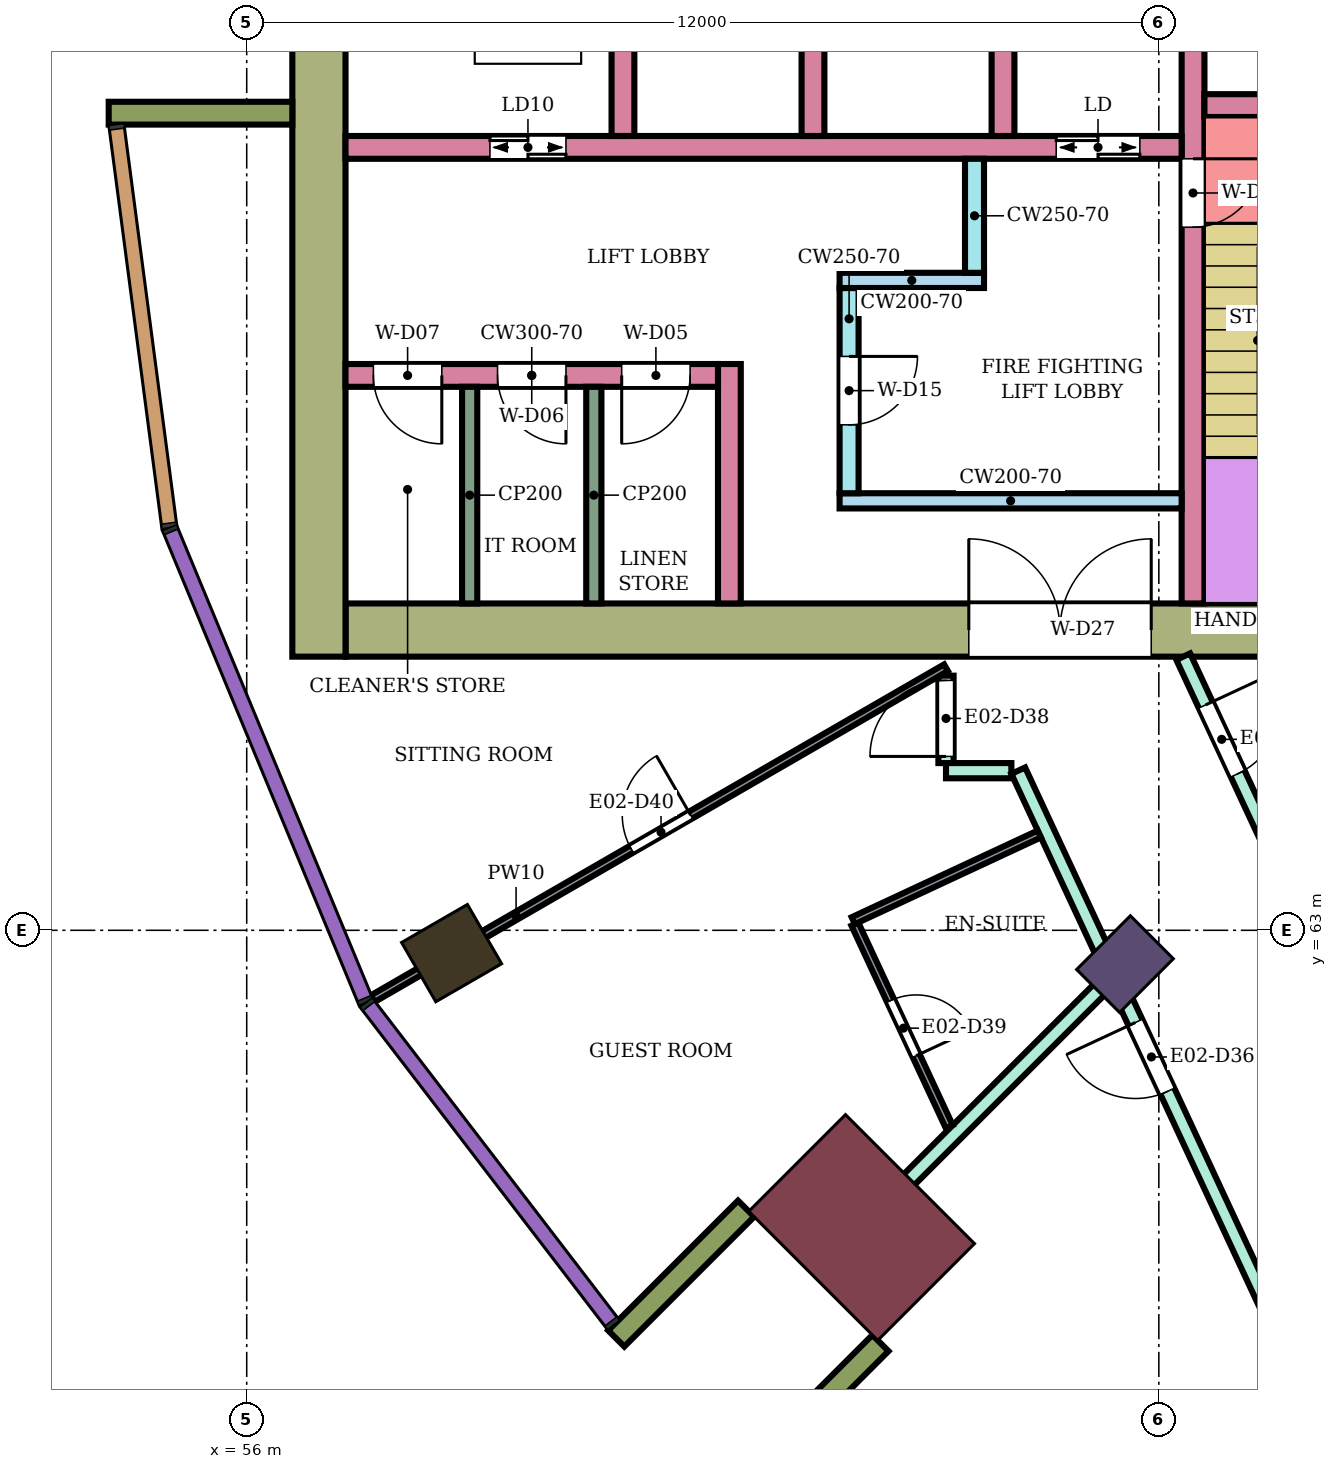
"""IFC4 building model, lengths in metres.
Left out: names, types, materials, properties, quantities, classifications, styles, units other than length and angle.
Written with IfcOpenShell. Run it as: python <this file> out.ifc"""

import sys

from ifc_helpers import new_model, si_unit, direction, frame, frame_2d, origin, origin_2d, place, context, subcontext, project, spatial, rectangle, extrude, element, fill, save


model = new_model("IFC4")
c1 = context("Model", 3, precision=1e-05, world=origin(), true_north=direction((0.0, 1.0)))
c2 = subcontext(c1, "Body", "Model", "MODEL_VIEW")
j1 = project(units=[si_unit("LENGTHUNIT", "METRE"), si_unit("PLANEANGLEUNIT", "RADIAN")], contexts=[c1])
p1 = place(None, origin())
s1 = spatial("IfcSite", under=j1, at=p1, CompositionType="ELEMENT")
p2 = place(p1, origin())
s2 = spatial("IfcBuilding", under=s1, at=p2, CompositionType="ELEMENT")
p3 = place(p2, frame((0.0, 0.0, 134.1)))
s3 = spatial("IfcBuildingStorey", under=s2, at=p3, CompositionType="ELEMENT", Elevation=134.1)
p4 = place(p3, frame((58.696, 62.7, 0.0), z_axis=(0.0, 0.0, 1.0), x_axis=(-0.866025403784, -0.5, 0.0)))
e1 = element("IfcColumn", 1, at=p4, inside=s3, PredefinedType="COLUMN", context=c2, shape_type="SweptSolid", body=[
    extrude(rectangle(XDim=1.0, YDim=0.9, at=origin_2d()), origin(), (0.0, 0.0, 1.0), 3.9),
])
p5 = place(p3, frame((67.555, 62.555, 0.0), z_axis=(0.0, 0.0, 1.0), x_axis=(-0.707106781187, -0.707106781187, 0.0)))
e2 = element("IfcColumn", 2, at=p5, inside=s3, PredefinedType="COLUMN", context=c2, shape_type="SweptSolid", body=[
    extrude(rectangle(XDim=1.0, YDim=0.8, at=origin_2d()), origin(), (0.0, 0.0, 1.0), 3.9),
])
p6 = place(p3, frame((64.09, 59.09, 0.0), z_axis=(0.0, 0.0, 1.0), x_axis=(-0.707106781187, -0.707106781187, 0.0)))
e3 = element("IfcColumn", 3, at=p6, inside=s3, PredefinedType="COLUMN", context=c2, shape_type="SweptSolid", body=[
    extrude(rectangle(XDim=1.8, YDim=2.4, at=origin_2d()), origin(), (0.0, 0.0, 1.0), 3.9),
])
p7 = place(p3, frame((72.1, 66.95, 0.0), z_axis=(0.0, 0.0, 1.0), x_axis=(-1.0, 0.0, 0.0)))
e4 = element("IfcWall", 4, at=p7, inside=s3, PredefinedType="SHEAR", context=c2, shape_type="SweptSolid", body=[
    extrude(rectangle(XDim=14.8, YDim=0.7, at=frame_2d((7.4, 0.0))), origin(), (0.0, 0.0, 1.0), 3.58),
])
p8 = place(p7, frame((4.2, 0.0, 0.0)))
e5 = element("IfcOpeningElement", 5, at=p8, cuts=e4, PredefinedType="OPENING", context=c2, shape_type="SweptSolid", body=[
    extrude(rectangle(XDim=2.4, YDim=2.4, at=frame_2d((1.2, 1.2))), frame((0.0, 0.36, 0.0), z_axis=(0.0, -1.0, 0.0), x_axis=(1.0, 0.0, 0.0)), (0.0, 0.0, 1.0), 0.72),
])
p9 = place(p3, frame((56.95, 83.4, 0.0), z_axis=(0.0, 0.0, 1.0), x_axis=(0.0, -1.0, 0.0)))
e6 = element("IfcWall", 6, at=p9, inside=s3, PredefinedType="SHEAR", context=c2, shape_type="SweptSolid", body=[
    extrude(rectangle(XDim=16.8, YDim=0.7, at=frame_2d((8.4, 0.0))), origin(), (0.0, 0.0, 1.0), 3.58),
])
p10 = place(p3, frame((68.45, 75.0, 0.0), z_axis=(0.0, 0.0, 1.0), x_axis=(0.0, -1.0, 0.0)))
e7 = element("IfcWall", 7, at=p10, inside=s3, PredefinedType="SHEAR", context=c2, shape_type="SweptSolid", body=[
    extrude(rectangle(XDim=7.7, YDim=0.3, at=frame_2d((3.85, 0.0))), origin(), (0.0, 0.0, 1.0), 3.58),
])
p11 = place(p10, frame((1.85, 0.0, 0.0)))
e8 = element("IfcOpeningElement", 8, at=p11, cuts=e7, PredefinedType="OPENING", context=c2, shape_type="SweptSolid", body=[
    extrude(rectangle(XDim=0.9, YDim=2.1, at=frame_2d((0.45, 1.05))), frame((0.0, 0.16, 0.0), z_axis=(0.0, -1.0, 0.0), x_axis=(1.0, 0.0, 0.0)), (0.0, 0.0, 1.0), 0.32),
])
p12 = place(p3, frame((71.65, 73.85, 0.0), z_axis=(0.0, 0.0, 1.0), x_axis=(-1.0, 0.0, 0.0)))
e9 = element("IfcWall", 9, at=p12, inside=s3, PredefinedType="SHEAR", context=c2, shape_type="SweptSolid", body=[
    extrude(rectangle(XDim=3.05, YDim=0.3, at=frame_2d((1.525, 0.0))), origin(), (0.0, 0.0, 1.0), 3.58),
])
p13 = place(p12, frame((1.1, 0.0, 0.0)))
e10 = element("IfcOpeningElement", 10, at=p13, cuts=e9, PredefinedType="OPENING", context=c2, shape_type="SweptSolid", body=[
    extrude(rectangle(XDim=0.7, YDim=2.0, at=frame_2d((0.35, 1.0))), frame((0.0, 0.16, 0.0), z_axis=(0.0, -1.0, 0.0), x_axis=(1.0, 0.0, 0.0)), (0.0, 0.0, 1.0), 0.32),
])
p14 = place(p3, frame((68.3, 73.3, 0.0), z_axis=(0.0, 0.0, 1.0), x_axis=(-1.0, 0.0, 0.0)))
e11 = element("IfcWall", 11, at=p14, inside=s3, PredefinedType="SHEAR", context=c2, shape_type="SweptSolid", body=[
    extrude(rectangle(XDim=11.0, YDim=0.3, at=frame_2d((5.5, 0.0))), origin(), (0.0, 0.0, 1.0), 3.58),
])
p15 = place(p14, frame((0.55, 0.0, 0.0)))
e12 = element("IfcOpeningElement", 12, at=p15, cuts=e11, PredefinedType="OPENING", context=c2, shape_type="SweptSolid", body=[
    extrude(rectangle(XDim=1.1, YDim=2.1, at=frame_2d((0.55, 1.05))), frame((0.0, 0.16, 0.0), z_axis=(0.0, -1.0, 0.0), x_axis=(1.0, 0.0, 0.0)), (0.0, 0.0, 1.0), 0.32),
])
p16 = place(p14, frame((8.1, 0.0, 0.0)))
e13 = element("IfcOpeningElement", 13, at=p16, cuts=e11, PredefinedType="OPENING", context=c2, shape_type="SweptSolid", body=[
    extrude(rectangle(XDim=1.0, YDim=2.1, at=frame_2d((0.5, 1.05))), frame((0.0, 0.16, 0.0), z_axis=(0.0, -1.0, 0.0), x_axis=(1.0, 0.0, 0.0)), (0.0, 0.0, 1.0), 0.32),
])
for number, where, z_axis, x_axis in (
    (14, (65.95, 76.0, 0.0), (0.0, 0.0, 1.0), (0.0, -1.0, 0.0)),
    (15, (63.45, 76.0, 0.0), (0.0, 0.0, 1.0), (0.0, -1.0, 0.0)),
    (16, (60.95, 76.0, 0.0), (0.0, 0.0, 1.0), (0.0, -1.0, 0.0)),
):
    element("IfcWall", number, at=place(p3, frame(where, z_axis=z_axis, x_axis=x_axis)), inside=s3, PredefinedType="SHEAR", context=c2, shape_type="SweptSolid", body=[
        extrude(rectangle(XDim=2.55, YDim=0.3, at=frame_2d((1.275, 0.0))), origin(), (0.0, 0.0, 1.0), 3.58),
    ])
p17 = place(p3, frame((68.3, 68.65, 0.0), z_axis=(0.0, 0.0, 1.0), x_axis=(-1.0, 0.0, 0.0)))
e17 = element("IfcWall", 17, at=p17, inside=s3, PredefinedType="SHEAR", context=c2, shape_type="SweptSolid", body=[
    extrude(rectangle(XDim=4.5, YDim=0.2, at=frame_2d((2.25, 0.0))), origin(), (0.0, 0.0, 1.0), 3.58),
])
p18 = place(p3, frame((63.925, 71.45, 0.0), z_axis=(0.0, 0.0, 1.0), x_axis=(0.0, -1.0, 0.0)))
e18 = element("IfcWall", 18, at=p18, inside=s3, PredefinedType="SHEAR", context=c2, shape_type="SweptSolid", body=[
    extrude(rectangle(XDim=2.7, YDim=0.25, at=frame_2d((1.35, 0.0))), origin(), (0.0, 0.0, 1.0), 3.58),
])
p19 = place(p18, frame((0.9, 0.0, 0.0)))
e19 = element("IfcOpeningElement", 19, at=p19, cuts=e18, PredefinedType="OPENING", context=c2, shape_type="SweptSolid", body=[
    extrude(rectangle(XDim=0.9, YDim=2.1, at=frame_2d((0.45, 1.05))), frame((0.0, 0.135, 0.0), z_axis=(0.0, -1.0, 0.0), x_axis=(1.0, 0.0, 0.0)), (0.0, 0.0, 1.0), 0.27),
])
p20 = place(p3, frame((65.7, 71.55, 0.0), z_axis=(0.0, 0.0, 1.0), x_axis=(-1.0, 0.0, 0.0)))
e20 = element("IfcWall", 20, at=p20, inside=s3, PredefinedType="SHEAR", context=c2, shape_type="SweptSolid", body=[
    extrude(rectangle(XDim=1.9, YDim=0.2, at=frame_2d((0.95, 0.0))), origin(), (0.0, 0.0, 1.0), 3.58),
])
p21 = place(p3, frame((65.575, 73.15, 0.0), z_axis=(0.0, 0.0, 1.0), x_axis=(0.0, -1.0, 0.0)))
e21 = element("IfcWall", 21, at=p21, inside=s3, PredefinedType="SHEAR", context=c2, shape_type="SweptSolid", body=[
    extrude(rectangle(XDim=1.5, YDim=0.25, at=frame_2d((0.75, 0.0))), origin(), (0.0, 0.0, 1.0), 3.58),
])
p22 = place(p3, frame((62.35, 70.45, 0.0), z_axis=(0.0, 0.0, 1.0), x_axis=(0.0, -1.0, 0.0)))
e22 = element("IfcWall", 22, at=p22, inside=s3, PredefinedType="SHEAR", context=c2, shape_type="SweptSolid", body=[
    extrude(rectangle(XDim=3.15, YDim=0.3, at=frame_2d((1.575, 0.0))), origin(), (0.0, 0.0, 1.0), 3.58),
])
p23 = place(p3, frame((62.2, 70.3, 0.0), z_axis=(0.0, 0.0, 1.0), x_axis=(-1.0, 0.0, 0.0)))
e23 = element("IfcWall", 23, at=p23, inside=s3, PredefinedType="SHEAR", context=c2, shape_type="SweptSolid", body=[
    extrude(rectangle(XDim=4.9, YDim=0.3, at=frame_2d((2.45, 0.0))), origin(), (0.0, 0.0, 1.0), 3.58),
])
p24 = place(p23, frame((0.367, 0.0, 0.0)))
e24 = element("IfcOpeningElement", 24, at=p24, cuts=e23, PredefinedType="OPENING", context=c2, shape_type="SweptSolid", body=[
    extrude(rectangle(XDim=0.9, YDim=2.1, at=frame_2d((0.45, 1.05))), frame((0.0, 0.16, 0.0), z_axis=(0.0, -1.0, 0.0), x_axis=(1.0, 0.0, 0.0)), (0.0, 0.0, 1.0), 0.32),
])
p25 = place(p23, frame((2.0, 0.0, 0.0)))
e25 = element("IfcOpeningElement", 25, at=p25, cuts=e23, PredefinedType="OPENING", context=c2, shape_type="SweptSolid", body=[
    extrude(rectangle(XDim=0.9, YDim=2.1, at=frame_2d((0.45, 1.05))), frame((0.0, 0.16, 0.0), z_axis=(0.0, -1.0, 0.0), x_axis=(1.0, 0.0, 0.0)), (0.0, 0.0, 1.0), 0.32),
])
p26 = place(p23, frame((3.633, 0.0, 0.0)))
e26 = element("IfcOpeningElement", 26, at=p26, cuts=e23, PredefinedType="OPENING", context=c2, shape_type="SweptSolid", body=[
    extrude(rectangle(XDim=0.9, YDim=2.1, at=frame_2d((0.45, 1.05))), frame((0.0, 0.16, 0.0), z_axis=(0.0, -1.0, 0.0), x_axis=(1.0, 0.0, 0.0)), (0.0, 0.0, 1.0), 0.32),
])
for number, where, z_axis, x_axis in (
    (27, (56.6, 73.75, 0.0), (0.0, 0.0, 1.0), (-1.0, 0.0, 0.0)),
    (28, (62.57, 59.338, 0.0), (0.0, 0.0, 1.0), (-0.707, -0.707, 0.0)),
    (29, (64.338, 57.57, 0.0), (0.0, 0.0, 1.0), (-0.707, -0.707, 0.0)),
):
    element("IfcWall", number, at=place(p3, frame(where, z_axis=z_axis, x_axis=x_axis)), inside=s3, PredefinedType="NOTDEFINED", context=c2, shape_type="SweptSolid", body=[
        extrude(rectangle(XDim=2.416, YDim=0.3, at=frame_2d((1.208, 0.0))), origin(), (0.0, 0.0, 1.0), 3.9),
    ])
p27 = place(p3, frame((63.592, 58.599, 0.0), z_axis=(0.0, 0.0, 1.0), x_axis=(0.707292886396, 0.706920626982, 0.0)))
e30 = element("IfcWall", 30, at=p27, inside=s3, PredefinedType="PARTITIONING", context=c2, shape_type="SweptSolid", body=[
    extrude(rectangle(XDim=5.247, YDim=0.2, at=frame_2d((2.623, 0.0))), origin(), (0.0, 0.0, 1.0), 3.45),
])
p28 = place(p3, frame((65.2, 65.2, 0.0), z_axis=(0.0, 0.0, 1.0), x_axis=(0.0, 1.0, 0.0)))
e31 = element("IfcWall", 31, at=p28, inside=s3, PredefinedType="PARTITIONING", context=c2, shape_type="SweptSolid", body=[
    extrude(rectangle(XDim=1.15, YDim=0.2, at=frame_2d((0.575, 0.0))), origin(), (0.0, 0.0, 1.0), 3.45),
])
p29 = place(p28, frame((0.087, 0.0, 0.0)))
e32 = element("IfcOpeningElement", 32, at=p29, cuts=e31, PredefinedType="OPENING", context=c2, shape_type="SweptSolid", body=[
    extrude(rectangle(XDim=1.0, YDim=2.1, at=frame_2d((0.5, 1.05))), frame((0.0, 0.11, 0.0), z_axis=(0.0, -1.0, 0.0), x_axis=(1.0, 0.0, 0.0)), (0.0, 0.0, 1.0), 0.22),
])
p30 = place(p3, frame((65.2, 65.1, 0.0), z_axis=(0.0, 0.0, 1.0), x_axis=(1.0, 0.0, 0.0)))
e33 = element("IfcWall", 33, at=p30, inside=s3, PredefinedType="PARTITIONING", context=c2, shape_type="SweptSolid", body=[
    extrude(rectangle(XDim=0.86, YDim=0.2, at=frame_2d((0.43, 0.0))), origin(), (0.0, 0.0, 1.0), 3.45),
])
p31 = place(p3, frame((66.15, 65.1, 0.0), z_axis=(0.0, 0.0, 1.0), x_axis=(0.421814710342, -0.906682055706, 0.0)))
e34 = element("IfcWall", 34, at=p31, inside=s3, PredefinedType="PARTITIONING", context=c2, shape_type="SweptSolid", body=[
    extrude(rectangle(XDim=8.228, YDim=0.2, at=frame_2d((4.114, 0.0))), origin(), (0.0, 0.0, 1.0), 3.45),
])
p32 = place(p31, frame((3.654, 0.0, 0.0)))
e35 = element("IfcOpeningElement", 35, at=p32, cuts=e34, PredefinedType="OPENING", context=c2, shape_type="SweptSolid", body=[
    extrude(rectangle(XDim=1.0, YDim=2.1, at=frame_2d((0.5, 1.05))), frame((0.0, 0.11, 0.0), z_axis=(0.0, -1.0, 0.0), x_axis=(1.0, 0.0, 0.0)), (0.0, 0.0, 1.0), 0.22),
])
p33 = place(p3, frame((68.321, 66.6, 0.0), z_axis=(0.0, 0.0, 1.0), x_axis=(0.421914092414, -0.906635813666, 0.0)))
e36 = element("IfcWall", 36, at=p33, inside=s3, PredefinedType="PARTITIONING", context=c2, shape_type="SweptSolid", body=[
    extrude(rectangle(XDim=7.459, YDim=0.2, at=frame_2d((3.73, 0.0))), origin(), (0.0, 0.0, 1.0), 3.45),
])
p34 = place(p33, frame((0.7, 0.0, 0.0)))
e37 = element("IfcOpeningElement", 37, at=p34, cuts=e36, PredefinedType="OPENING", context=c2, shape_type="SweptSolid", body=[
    extrude(rectangle(XDim=1.0, YDim=2.1, at=frame_2d((0.5, 1.05))), frame((0.0, 0.11, 0.0), z_axis=(0.0, -1.0, 0.0), x_axis=(1.0, 0.0, 0.0)), (0.0, 0.0, 1.0), 0.22),
])
p35 = place(p3, frame((57.659, 62.101, 0.0), z_axis=(0.0, 0.0, 1.0), x_axis=(0.86602264145, 0.500004784474, 0.0)))
e38 = element("IfcWall", 38, at=p35, inside=s3, PredefinedType="PARTITIONING", context=c2, shape_type="SweptSolid", body=[
    extrude(rectangle(XDim=8.708, YDim=0.1, at=frame_2d((4.354, 0.0))), origin(), (0.0, 0.0, 1.0), 3.45),
])
p36 = place(p35, frame((3.929, 0.0, 0.0)))
e39 = element("IfcOpeningElement", 39, at=p36, cuts=e38, PredefinedType="OPENING", context=c2, shape_type="SweptSolid", body=[
    extrude(rectangle(XDim=0.9, YDim=2.1, at=frame_2d((0.45, 1.05))), frame((0.0, 0.06, 0.0), z_axis=(0.0, -1.0, 0.0), x_axis=(1.0, 0.0, 0.0)), (0.0, 0.0, 1.0), 0.12),
])
p37 = place(p3, frame((64.001, 63.082, 0.0), z_axis=(0.0, 0.0, 1.0), x_axis=(0.422271882089, -0.906469225951, 0.0)))
e40 = element("IfcWall", 40, at=p37, inside=s3, PredefinedType="PARTITIONING", context=c2, shape_type="SweptSolid", body=[
    extrude(rectangle(XDim=2.941, YDim=0.1, at=frame_2d((1.471, 0.0))), origin(), (0.0, 0.0, 1.0), 3.45),
])
p38 = place(p37, frame((1.111, 0.0, 0.0)))
e41 = element("IfcOpeningElement", 41, at=p38, cuts=e40, PredefinedType="OPENING", context=c2, shape_type="SweptSolid", body=[
    extrude(rectangle(XDim=0.8, YDim=2.1, at=frame_2d((0.4, 1.05))), frame((0.0, 0.06, 0.0), z_axis=(0.0, -1.0, 0.0), x_axis=(1.0, 0.0, 0.0)), (0.0, 0.0, 1.0), 0.12),
])
p39 = place(p3, frame((63.98, 63.127, 0.0), z_axis=(0.0, 0.0, 1.0), x_axis=(0.90649017149, 0.422226916469, 0.0)))
e42 = element("IfcWall", 42, at=p39, inside=s3, PredefinedType="PARTITIONING", context=c2, shape_type="SweptSolid", body=[
    extrude(rectangle(XDim=2.7, YDim=0.1, at=frame_2d((1.35, 0.0))), origin(), (0.0, 0.0, 1.0), 3.45),
])
for number, where, z_axis, x_axis in (
    (43, (60.567, 70.15, 0.0), (0.0, 0.0, 1.0), (0.0, -1.0, 0.0)),
    (44, (58.933, 70.15, 0.0), (0.0, 0.0, 1.0), (0.0, -1.0, 0.0)),
):
    element("IfcWall", number, at=place(p3, frame(where, z_axis=z_axis, x_axis=x_axis)), inside=s3, PredefinedType="PARTITIONING", context=c2, shape_type="SweptSolid", body=[
        extrude(rectangle(XDim=2.85, YDim=0.2, at=frame_2d((1.425, 0.0))), origin(), (0.0, 0.0, 1.0), 3.58),
    ])
p40 = place(p32, frame((1.0, 0.0, 0.0), z_axis=(0.0, 0.0, 1.0), x_axis=(-1.0, 0.0, 0.0)))
e45 = element("IfcDoor", 45, at=p40, inside=s3, OperationType="SINGLE_SWING_RIGHT", PredefinedType="DOOR", context=c2, shape_type="SweptSolid", body=[
    extrude(rectangle(XDim=1.0, YDim=2.1, at=frame_2d((0.5, 1.05))), frame((0.0, 0.025, 0.0), z_axis=(0.0, -1.0, 0.0), x_axis=(1.0, 0.0, 0.0)), (0.0, 0.0, 1.0), 0.05),
])
fill(e35, e45)
p41 = place(p29, origin())
e46 = element("IfcDoor", 46, at=p41, inside=s3, OperationType="SINGLE_SWING_LEFT", PredefinedType="DOOR", context=c2, shape_type="SweptSolid", body=[
    extrude(rectangle(XDim=1.0, YDim=2.1, at=frame_2d((0.5, 1.05))), frame((0.0, 0.025, 0.0), z_axis=(0.0, -1.0, 0.0), x_axis=(1.0, 0.0, 0.0)), (0.0, 0.0, 1.0), 0.05),
])
fill(e32, e46)
p42 = place(p38, origin())
e47 = element("IfcDoor", 47, at=p42, inside=s3, OperationType="SINGLE_SWING_RIGHT", PredefinedType="DOOR", context=c2, shape_type="SweptSolid", body=[
    extrude(rectangle(XDim=0.8, YDim=2.1, at=frame_2d((0.4, 1.05))), frame((0.0, 0.025, 0.0), z_axis=(0.0, -1.0, 0.0), x_axis=(1.0, 0.0, 0.0)), (0.0, 0.0, 1.0), 0.05),
])
fill(e41, e47)
p43 = place(p36, origin())
e48 = element("IfcDoor", 48, at=p43, inside=s3, OperationType="SINGLE_SWING_RIGHT", PredefinedType="DOOR", context=c2, shape_type="SweptSolid", body=[
    extrude(rectangle(XDim=0.9, YDim=2.1, at=frame_2d((0.45, 1.05))), frame((0.0, 0.025, 0.0), z_axis=(0.0, -1.0, 0.0), x_axis=(1.0, 0.0, 0.0)), (0.0, 0.0, 1.0), 0.05),
])
fill(e39, e48)
p44 = place(p34, origin())
e49 = element("IfcDoor", 49, at=p44, inside=s3, OperationType="SINGLE_SWING_LEFT", PredefinedType="DOOR", context=c2, shape_type="SweptSolid", body=[
    extrude(rectangle(XDim=1.0, YDim=2.1, at=frame_2d((0.5, 1.05))), frame((0.0, 0.025, 0.0), z_axis=(0.0, -1.0, 0.0), x_axis=(1.0, 0.0, 0.0)), (0.0, 0.0, 1.0), 0.05),
])
fill(e37, e49)
p45 = place(p11, origin())
e50 = element("IfcDoor", 50, at=p45, inside=s3, OperationType="SINGLE_SWING_LEFT", PredefinedType="DOOR", context=c2, shape_type="SweptSolid", body=[
    extrude(rectangle(XDim=0.9, YDim=2.1, at=frame_2d((0.45, 1.05))), frame((0.0, 0.025, 0.0), z_axis=(0.0, -1.0, 0.0), x_axis=(1.0, 0.0, 0.0)), (0.0, 0.0, 1.0), 0.05),
])
fill(e8, e50)
p46 = place(p15, origin())
e51 = element("IfcDoor", 51, at=p46, inside=s3, OperationType="DOUBLE_DOOR_SLIDING", PredefinedType="DOOR", context=c2, shape_type="SweptSolid", body=[
    extrude(rectangle(XDim=1.1, YDim=2.1, at=frame_2d((0.55, 1.05))), frame((0.0, 0.025, 0.0), z_axis=(0.0, -1.0, 0.0), x_axis=(1.0, 0.0, 0.0)), (0.0, 0.0, 1.0), 0.05),
])
fill(e12, e51)
p47 = place(p16, origin())
e52 = element("IfcDoor", 52, at=p47, inside=s3, OperationType="DOUBLE_DOOR_SLIDING", PredefinedType="DOOR", context=c2, shape_type="SweptSolid", body=[
    extrude(rectangle(XDim=1.0, YDim=2.1, at=frame_2d((0.5, 1.05))), frame((0.0, 0.025, 0.0), z_axis=(0.0, -1.0, 0.0), x_axis=(1.0, 0.0, 0.0)), (0.0, 0.0, 1.0), 0.05),
])
fill(e13, e52)
p48 = place(p19, origin())
e53 = element("IfcDoor", 53, at=p48, inside=s3, OperationType="SINGLE_SWING_LEFT", PredefinedType="DOOR", context=c2, shape_type="SweptSolid", body=[
    extrude(rectangle(XDim=0.9, YDim=2.1, at=frame_2d((0.45, 1.05))), frame((0.0, 0.025, 0.0), z_axis=(0.0, -1.0, 0.0), x_axis=(1.0, 0.0, 0.0)), (0.0, 0.0, 1.0), 0.05),
])
fill(e19, e53)
p49 = place(p24, origin())
e54 = element("IfcDoor", 54, at=p49, inside=s3, OperationType="SINGLE_SWING_RIGHT", PredefinedType="DOOR", context=c2, shape_type="SweptSolid", body=[
    extrude(rectangle(XDim=0.9, YDim=2.1, at=frame_2d((0.45, 1.05))), frame((0.0, 0.025, 0.0), z_axis=(0.0, -1.0, 0.0), x_axis=(1.0, 0.0, 0.0)), (0.0, 0.0, 1.0), 0.05),
])
fill(e24, e54)
p50 = place(p25, origin())
e55 = element("IfcDoor", 55, at=p50, inside=s3, OperationType="SINGLE_SWING_LEFT", PredefinedType="DOOR", context=c2, shape_type="SweptSolid", body=[
    extrude(rectangle(XDim=0.9, YDim=2.1, at=frame_2d((0.45, 1.05))), frame((0.0, 0.025, 0.0), z_axis=(0.0, -1.0, 0.0), x_axis=(1.0, 0.0, 0.0)), (0.0, 0.0, 1.0), 0.05),
])
fill(e25, e55)
p51 = place(p26, origin())
e56 = element("IfcDoor", 56, at=p51, inside=s3, OperationType="SINGLE_SWING_LEFT", PredefinedType="DOOR", context=c2, shape_type="SweptSolid", body=[
    extrude(rectangle(XDim=0.9, YDim=2.1, at=frame_2d((0.45, 1.05))), frame((0.0, 0.025, 0.0), z_axis=(0.0, -1.0, 0.0), x_axis=(1.0, 0.0, 0.0)), (0.0, 0.0, 1.0), 0.05),
])
fill(e26, e56)
p52 = place(p8, frame((2.4, 0.0, 0.0), z_axis=(0.0, 0.0, 1.0), x_axis=(-1.0, 0.0, 0.0)))
e57 = element("IfcDoor", 57, at=p52, inside=s3, OperationType="DOUBLE_DOOR_SINGLE_SWING", PredefinedType="DOOR", context=c2, shape_type="SweptSolid", body=[
    extrude(rectangle(XDim=2.4, YDim=2.4, at=frame_2d((1.2, 1.2))), frame((0.0, 0.025, 0.0), z_axis=(0.0, -1.0, 0.0), x_axis=(1.0, 0.0, 0.0)), (0.0, 0.0, 1.0), 0.05),
])
fill(e5, e57)
save(model, sys.argv[1])
